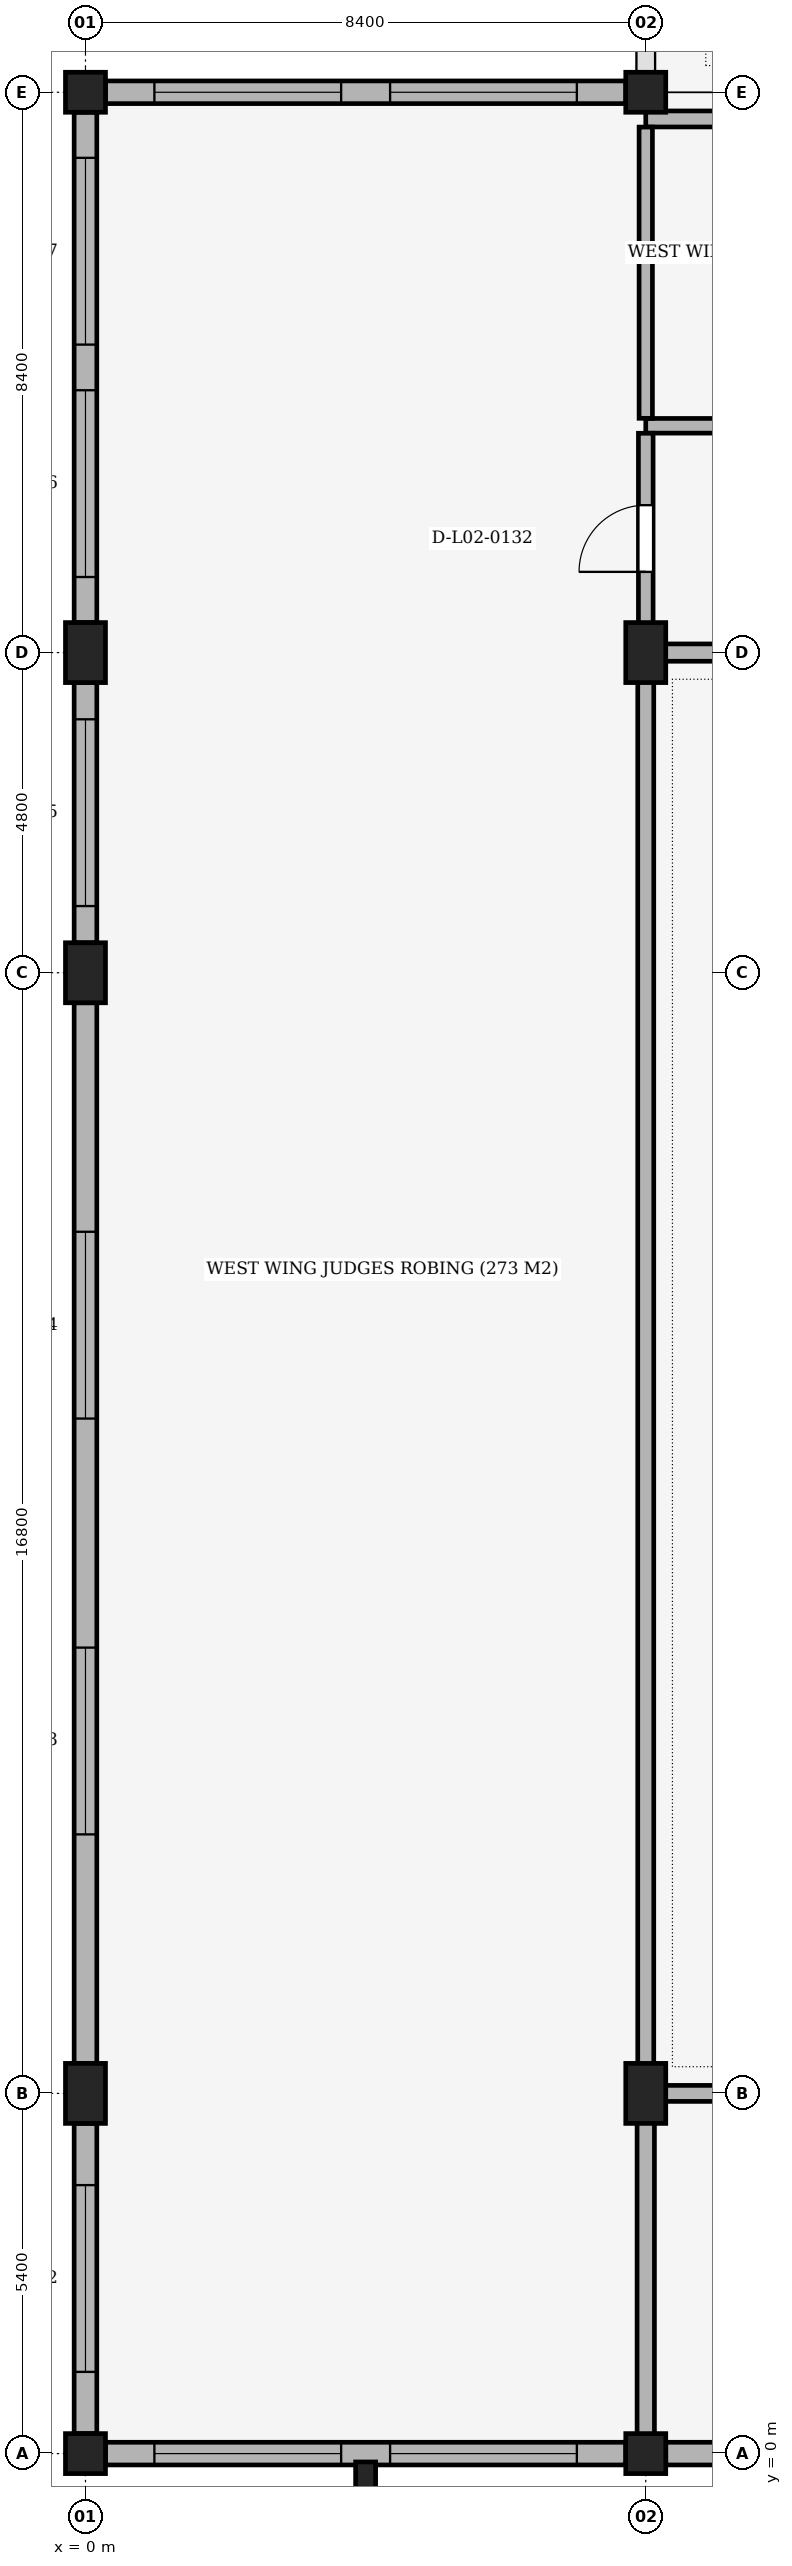
"""IFC4 building model, lengths in metres.
Left out: names, types, materials, properties, quantities, classifications, styles, units other than length and angle.
Written with IfcOpenShell. Run it as: python <this file> out.ifc"""

import sys

from ifc_helpers import new_model, si_unit, direction, frame, frame_2d, origin, origin_with_axes, origin_2d, place, context, subcontext, project, spatial, rectangle, extrude, element, fill, save


model = new_model("IFC4")
c1 = context("Model", 3, precision=1e-05, world=origin(), true_north=direction((0.0, 1.0)))
c2 = subcontext(c1, "Body", "Model", "MODEL_VIEW")
j1 = project(units=[si_unit("LENGTHUNIT", "METRE"), si_unit("PLANEANGLEUNIT", "RADIAN")], contexts=[c1])
p1 = place(None, origin())
s1 = spatial("IfcSite", under=j1, at=p1, CompositionType="ELEMENT")
p2 = place(p1, origin())
s2 = spatial("IfcBuilding", under=s1, at=p2, CompositionType="ELEMENT")
p3 = place(p2, frame((0.0, 0.0, 10.2)))
s3 = spatial("IfcBuildingStorey", under=s2, at=p3, CompositionType="ELEMENT", Elevation=10.2)
p4 = place(p3, origin_with_axes())
e1 = element("IfcColumn", 1, at=p4, inside=s3, PredefinedType="COLUMN", context=c2, shape_type="SweptSolid", body=[
    extrude(rectangle(XDim=0.6, YDim=0.6, at=origin_2d()), origin(), (0.0, 0.0, 1.0), 5.1),
])
for number, where, z_axis, x_axis in (
    (2, (0.0, 5.4, 0.0), (0.0, 0.0, 1.0), (1.0, 0.0, 0.0)),
    (3, (0.0, 22.2, 0.0), (0.0, 0.0, 1.0), (1.0, 0.0, 0.0)),
    (4, (0.0, 27.0, 0.0), (0.0, 0.0, 1.0), (1.0, 0.0, 0.0)),
):
    element("IfcColumn", number, at=place(p3, frame(where, z_axis=z_axis, x_axis=x_axis)), inside=s3, PredefinedType="COLUMN", context=c2, shape_type="SweptSolid", body=[
        extrude(rectangle(XDim=0.6, YDim=0.9, at=origin_2d()), origin(), (0.0, 0.0, 1.0), 5.1),
    ])
for number, where, z_axis, x_axis in (
    (5, (0.0, 35.4, 0.0), (0.0, 0.0, 1.0), (1.0, 0.0, 0.0)),
    (6, (8.4, 0.0, 0.0), (0.0, 0.0, 1.0), (1.0, 0.0, 0.0)),
):
    element("IfcColumn", number, at=place(p3, frame(where, z_axis=z_axis, x_axis=x_axis)), inside=s3, PredefinedType="COLUMN", context=c2, shape_type="SweptSolid", body=[
        extrude(rectangle(XDim=0.6, YDim=0.6, at=origin_2d()), origin(), (0.0, 0.0, 1.0), 5.1),
    ])
for number, where, z_axis, x_axis in (
    (7, (8.4, 5.4, 0.0), (0.0, 0.0, 1.0), (1.0, 0.0, 0.0)),
    (8, (8.4, 27.0, 0.0), (0.0, 0.0, 1.0), (1.0, 0.0, 0.0)),
):
    element("IfcColumn", number, at=place(p3, frame(where, z_axis=z_axis, x_axis=x_axis)), inside=s3, PredefinedType="COLUMN", context=c2, shape_type="SweptSolid", body=[
        extrude(rectangle(XDim=0.6, YDim=0.9, at=origin_2d()), origin(), (0.0, 0.0, 1.0), 5.1),
    ])
p5 = place(p3, frame((8.4, 35.4, 0.0), z_axis=(0.0, 0.0, 1.0), x_axis=(1.0, 0.0, 0.0)))
e9 = element("IfcColumn", 9, at=p5, inside=s3, PredefinedType="COLUMN", context=c2, shape_type="SweptSolid", body=[
    extrude(rectangle(XDim=0.6, YDim=0.6, at=origin_2d()), origin(), (0.0, 0.0, 1.0), 5.1),
])
p6 = place(p3, frame((4.2, -0.35, 0.0), z_axis=(0.0, 0.0, 1.0), x_axis=(1.0, 0.0, 0.0)))
e10 = element("IfcColumn", 10, at=p6, inside=s3, PredefinedType="PILASTER", context=c2, shape_type="SweptSolid", body=[
    extrude(rectangle(XDim=0.3, YDim=0.45, at=origin_2d()), origin(), (0.0, 0.0, 1.0), 5.1),
])
p7 = place(p3, frame((0.3, 35.4, 0.0), z_axis=(0.0, 0.0, 1.0), x_axis=(1.0, 0.0, 0.0)))
e11 = element("IfcWall", 11, at=p7, inside=s3, PredefinedType="SOLIDWALL", context=c2, shape_type="SweptSolid", body=[
    extrude(rectangle(XDim=7.8, YDim=0.34, at=frame_2d((3.9, 0.0))), origin(), (0.0, 0.0, 1.0), 4.12),
])
p8 = place(p7, frame((0.733, 0.0, 0.75)))
e12 = element("IfcOpeningElement", 12, at=p8, cuts=e11, PredefinedType="OPENING", context=c2, shape_type="SweptSolid", body=[
    extrude(rectangle(XDim=2.8, YDim=2.6, at=frame_2d((1.4, 1.3))), frame((0.0, 0.185, 0.0), z_axis=(0.0, -1.0, 0.0), x_axis=(1.0, 0.0, 0.0)), (0.0, 0.0, 1.0), 0.37),
])
p9 = place(p7, frame((4.267, 0.0, 0.75)))
e13 = element("IfcOpeningElement", 13, at=p9, cuts=e11, PredefinedType="OPENING", context=c2, shape_type="SweptSolid", body=[
    extrude(rectangle(XDim=2.8, YDim=2.6, at=frame_2d((1.4, 1.3))), frame((0.0, 0.185, 0.0), z_axis=(0.0, -1.0, 0.0), x_axis=(1.0, 0.0, 0.0)), (0.0, 0.0, 1.0), 0.37),
])
p10 = place(p3, frame((16.5, 0.0, 0.0), z_axis=(0.0, 0.0, 1.0), x_axis=(-1.0, 0.0, 0.0)))
e14 = element("IfcWall", 14, at=p10, inside=s3, PredefinedType="SOLIDWALL", context=c2, shape_type="SweptSolid", body=[
    extrude(rectangle(XDim=7.8, YDim=0.34, at=frame_2d((3.9, 0.0))), origin(), (0.0, 0.0, 1.0), 4.12),
])
p11 = place(p10, frame((0.733, 0.0, 0.75)))
e15 = element("IfcOpeningElement", 15, at=p11, cuts=e14, PredefinedType="OPENING", context=c2, shape_type="SweptSolid", body=[
    extrude(rectangle(XDim=2.8, YDim=2.6, at=frame_2d((1.4, 1.3))), frame((0.0, 0.185, 0.0), z_axis=(0.0, -1.0, 0.0), x_axis=(1.0, 0.0, 0.0)), (0.0, 0.0, 1.0), 0.37),
])
p12 = place(p10, frame((4.267, 0.0, 0.75)))
e16 = element("IfcOpeningElement", 16, at=p12, cuts=e14, PredefinedType="OPENING", context=c2, shape_type="SweptSolid", body=[
    extrude(rectangle(XDim=2.8, YDim=2.6, at=frame_2d((1.4, 1.3))), frame((0.0, 0.185, 0.0), z_axis=(0.0, -1.0, 0.0), x_axis=(1.0, 0.0, 0.0)), (0.0, 0.0, 1.0), 0.37),
])
p13 = place(p3, frame((8.1, 0.0, 0.0), z_axis=(0.0, 0.0, 1.0), x_axis=(-1.0, 0.0, 0.0)))
e17 = element("IfcWall", 17, at=p13, inside=s3, PredefinedType="SOLIDWALL", context=c2, shape_type="SweptSolid", body=[
    extrude(rectangle(XDim=7.8, YDim=0.34, at=frame_2d((3.9, 0.0))), origin(), (0.0, 0.0, 1.0), 4.12),
])
p14 = place(p13, frame((0.733, 0.0, 0.75)))
e18 = element("IfcOpeningElement", 18, at=p14, cuts=e17, PredefinedType="OPENING", context=c2, shape_type="SweptSolid", body=[
    extrude(rectangle(XDim=2.8, YDim=2.6, at=frame_2d((1.4, 1.3))), frame((0.0, 0.185, 0.0), z_axis=(0.0, -1.0, 0.0), x_axis=(1.0, 0.0, 0.0)), (0.0, 0.0, 1.0), 0.37),
])
p15 = place(p13, frame((4.267, 0.0, 0.75)))
e19 = element("IfcOpeningElement", 19, at=p15, cuts=e17, PredefinedType="OPENING", context=c2, shape_type="SweptSolid", body=[
    extrude(rectangle(XDim=2.8, YDim=2.6, at=frame_2d((1.4, 1.3))), frame((0.0, 0.185, 0.0), z_axis=(0.0, -1.0, 0.0), x_axis=(1.0, 0.0, 0.0)), (0.0, 0.0, 1.0), 0.37),
])
p16 = place(p3, frame((0.0, 0.3, 0.0), z_axis=(0.0, 0.0, 1.0), x_axis=(0.0, 1.0, 0.0)))
e20 = element("IfcWall", 20, at=p16, inside=s3, PredefinedType="SOLIDWALL", context=c2, shape_type="SweptSolid", body=[
    extrude(rectangle(XDim=4.65, YDim=0.34, at=frame_2d((2.325, 0.0))), origin(), (0.0, 0.0, 1.0), 4.27),
])
p17 = place(p16, frame((0.925, 0.0, 0.75)))
e21 = element("IfcOpeningElement", 21, at=p17, cuts=e20, PredefinedType="OPENING", context=c2, shape_type="SweptSolid", body=[
    extrude(rectangle(XDim=2.8, YDim=2.6, at=frame_2d((1.4, 1.3))), frame((0.0, 0.185, 0.0), z_axis=(0.0, -1.0, 0.0), x_axis=(1.0, 0.0, 0.0)), (0.0, 0.0, 1.0), 0.37),
])
p18 = place(p3, frame((0.0, 5.85, 0.0), z_axis=(0.0, 0.0, 1.0), x_axis=(0.0, 1.0, 0.0)))
e22 = element("IfcWall", 22, at=p18, inside=s3, PredefinedType="SOLIDWALL", context=c2, shape_type="SweptSolid", body=[
    extrude(rectangle(XDim=15.9, YDim=0.34, at=frame_2d((7.95, 0.0))), origin(), (0.0, 0.0, 1.0), 3.77),
])
p19 = place(p18, frame((3.433, 0.0, 0.75)))
e23 = element("IfcOpeningElement", 23, at=p19, cuts=e22, PredefinedType="OPENING", context=c2, shape_type="SweptSolid", body=[
    extrude(rectangle(XDim=2.8, YDim=2.6, at=frame_2d((1.4, 1.3))), frame((0.0, 0.185, 0.0), z_axis=(0.0, -1.0, 0.0), x_axis=(1.0, 0.0, 0.0)), (0.0, 0.0, 1.0), 0.37),
])
p20 = place(p18, frame((9.667, 0.0, 0.75)))
e24 = element("IfcOpeningElement", 24, at=p20, cuts=e22, PredefinedType="OPENING", context=c2, shape_type="SweptSolid", body=[
    extrude(rectangle(XDim=2.8, YDim=2.6, at=frame_2d((1.4, 1.3))), frame((0.0, 0.185, 0.0), z_axis=(0.0, -1.0, 0.0), x_axis=(1.0, 0.0, 0.0)), (0.0, 0.0, 1.0), 0.37),
])
p21 = place(p3, frame((0.0, 22.65, 0.0), z_axis=(0.0, 0.0, 1.0), x_axis=(0.0, 1.0, 0.0)))
e25 = element("IfcWall", 25, at=p21, inside=s3, PredefinedType="SOLIDWALL", context=c2, shape_type="SweptSolid", body=[
    extrude(rectangle(XDim=3.9, YDim=0.34, at=frame_2d((1.95, 0.0))), origin(), (0.0, 0.0, 1.0), 4.27),
])
p22 = place(p21, frame((0.55, 0.0, 0.75)))
e26 = element("IfcOpeningElement", 26, at=p22, cuts=e25, PredefinedType="OPENING", context=c2, shape_type="SweptSolid", body=[
    extrude(rectangle(XDim=2.8, YDim=2.6, at=frame_2d((1.4, 1.3))), frame((0.0, 0.185, 0.0), z_axis=(0.0, -1.0, 0.0), x_axis=(1.0, 0.0, 0.0)), (0.0, 0.0, 1.0), 0.37),
])
p23 = place(p3, frame((0.0, 27.45, 0.0), z_axis=(0.0, 0.0, 1.0), x_axis=(0.0, 1.0, 0.0)))
e27 = element("IfcWall", 27, at=p23, inside=s3, PredefinedType="SOLIDWALL", context=c2, shape_type="SweptSolid", body=[
    extrude(rectangle(XDim=7.65, YDim=0.34, at=frame_2d((3.825, 0.0))), origin(), (0.0, 0.0, 1.0), 4.12),
])
p24 = place(p23, frame((0.683, 0.0, 0.75)))
e28 = element("IfcOpeningElement", 28, at=p24, cuts=e27, PredefinedType="OPENING", context=c2, shape_type="SweptSolid", body=[
    extrude(rectangle(XDim=2.8, YDim=2.6, at=frame_2d((1.4, 1.3))), frame((0.0, 0.185, 0.0), z_axis=(0.0, -1.0, 0.0), x_axis=(1.0, 0.0, 0.0)), (0.0, 0.0, 1.0), 0.37),
])
p25 = place(p23, frame((4.167, 0.0, 0.75)))
e29 = element("IfcOpeningElement", 29, at=p25, cuts=e27, PredefinedType="OPENING", context=c2, shape_type="SweptSolid", body=[
    extrude(rectangle(XDim=2.8, YDim=2.6, at=frame_2d((1.4, 1.3))), frame((0.0, 0.185, 0.0), z_axis=(0.0, -1.0, 0.0), x_axis=(1.0, 0.0, 0.0)), (0.0, 0.0, 1.0), 0.37),
])
p26 = place(p3, frame((8.4, 5.4, 0.0), z_axis=(0.0, 0.0, 1.0), x_axis=(1.0, 0.0, 0.0)))
e30 = element("IfcWall", 30, at=p26, inside=s3, PredefinedType="PARTITIONING", context=c2, shape_type="SweptSolid", body=[
    extrude(rectangle(XDim=16.8, YDim=0.24, at=frame_2d((8.4, 0.0))), origin(), (0.0, 0.0, 1.0), 3.57),
])
p27 = place(p26, frame((7.95, 0.0, 0.0)))
e31 = element("IfcOpeningElement", 31, at=p27, cuts=e30, PredefinedType="OPENING", context=c2, shape_type="SweptSolid", body=[
    extrude(rectangle(XDim=0.9, YDim=2.1, at=frame_2d((0.45, 1.05))), frame((0.0, 0.135, 0.0), z_axis=(0.0, -1.0, 0.0), x_axis=(1.0, 0.0, 0.0)), (0.0, 0.0, 1.0), 0.27),
])
p28 = place(p3, frame((8.4, 27.0, 0.0), z_axis=(0.0, 0.0, 1.0), x_axis=(1.0, 0.0, 0.0)))
e32 = element("IfcWall", 32, at=p28, inside=s3, PredefinedType="PARTITIONING", context=c2, shape_type="SweptSolid", body=[
    extrude(rectangle(XDim=16.8, YDim=0.26, at=frame_2d((8.4, 0.0))), origin(), (0.0, 0.0, 1.0), 3.57),
])
p29 = place(p28, frame((7.4, 0.0, 0.0)))
e33 = element("IfcOpeningElement", 33, at=p29, cuts=e32, PredefinedType="OPENING", context=c2, shape_type="SweptSolid", body=[
    extrude(rectangle(XDim=2.0, YDim=2.5, at=frame_2d((1.0, 1.25))), frame((0.0, 0.145, 0.0), z_axis=(0.0, -1.0, 0.0), x_axis=(1.0, 0.0, 0.0)), (0.0, 0.0, 1.0), 0.29),
])
p30 = place(p3, frame((8.4, 30.4, 0.0), z_axis=(0.0, 0.0, 1.0), x_axis=(1.0, 0.0, 0.0)))
e34 = element("IfcWall", 34, at=p30, inside=s3, PredefinedType="PARTITIONING", context=c2, shape_type="SweptSolid", body=[
    extrude(rectangle(XDim=5.4, YDim=0.22, at=frame_2d((2.7, 0.0))), origin(), (0.0, 0.0, 1.0), 4.12),
])
p31 = place(p30, frame((2.25, 0.0, 0.0)))
e35 = element("IfcOpeningElement", 35, at=p31, cuts=e34, PredefinedType="OPENING", context=c2, shape_type="SweptSolid", body=[
    extrude(rectangle(XDim=0.9, YDim=2.2, at=frame_2d((0.45, 1.1))), frame((0.0, 0.125, 0.0), z_axis=(0.0, -1.0, 0.0), x_axis=(1.0, 0.0, 0.0)), (0.0, 0.0, 1.0), 0.25),
])
p32 = place(p3, frame((8.4, 35.0, 0.0), z_axis=(0.0, 0.0, 1.0), x_axis=(1.0, 0.0, 0.0)))
e36 = element("IfcWall", 36, at=p32, inside=s3, PredefinedType="PARTITIONING", context=c2, shape_type="SweptSolid", body=[
    extrude(rectangle(XDim=5.4, YDim=0.24, at=frame_2d((2.7, 0.0))), origin(), (0.0, 0.0, 1.0), 4.12),
])
p33 = place(p3, frame((8.4, -0.064, 0.0), z_axis=(0.0, 0.0, 1.0), x_axis=(0.0, 1.0, 0.0)))
e37 = element("IfcWall", 37, at=p33, inside=s3, PredefinedType="PARTITIONING", context=c2, shape_type="SweptSolid", body=[
    extrude(rectangle(XDim=5.342, YDim=0.26, at=frame_2d((2.671, 0.0))), origin(), (0.0, 0.0, 1.0), 3.67),
])
p34 = place(p3, frame((8.4, 5.522, 0.0), z_axis=(0.0, 0.0, 1.0), x_axis=(0.0, 1.0, 0.0)))
e38 = element("IfcWall", 38, at=p34, inside=s3, PredefinedType="PARTITIONING", context=c2, shape_type="SweptSolid", body=[
    extrude(rectangle(XDim=21.346, YDim=0.24, at=frame_2d((10.673, 0.0))), origin(), (0.0, 0.0, 1.0), 3.57),
])
p35 = place(p3, frame((8.4, 27.132, 0.0), z_axis=(0.0, 0.0, 1.0), x_axis=(0.0, 1.0, 0.0)))
e39 = element("IfcWall", 39, at=p35, inside=s3, PredefinedType="PARTITIONING", context=c2, shape_type="SweptSolid", body=[
    extrude(rectangle(XDim=3.156, YDim=0.22, at=frame_2d((1.578, 0.0))), origin(), (0.0, 0.0, 1.0), 3.67),
])
p36 = place(p35, frame((1.078, 0.0, 0.0)))
e40 = element("IfcOpeningElement", 40, at=p36, cuts=e39, PredefinedType="OPENING", context=c2, shape_type="SweptSolid", body=[
    extrude(rectangle(XDim=1.0, YDim=2.1, at=frame_2d((0.5, 1.05))), frame((0.0, 0.125, 0.0), z_axis=(0.0, -1.0, 0.0), x_axis=(1.0, 0.0, 0.0)), (0.0, 0.0, 1.0), 0.25),
])
p37 = place(p3, frame((8.4, 30.512, 0.0), z_axis=(0.0, 0.0, 1.0), x_axis=(0.0, 1.0, 0.0)))
e41 = element("IfcWall", 41, at=p37, inside=s3, PredefinedType="PARTITIONING", context=c2, shape_type="SweptSolid", body=[
    extrude(rectangle(XDim=4.366, YDim=0.2, at=frame_2d((2.183, 0.0))), origin(), (0.0, 0.0, 1.0), 4.12),
])
p38 = place(p8, origin())
e42 = element("IfcWindow", 42, at=p38, inside=s3, PartitioningType="SINGLE_PANEL", PredefinedType="WINDOW", context=c2, shape_type="SweptSolid", body=[
    extrude(rectangle(XDim=2.8, YDim=2.6, at=frame_2d((1.4, 1.3))), frame((0.0, 0.03, 0.0), z_axis=(0.0, -1.0, 0.0), x_axis=(1.0, 0.0, 0.0)), (0.0, 0.0, 1.0), 0.06),
])
fill(e12, e42)
p39 = place(p9, origin())
e43 = element("IfcWindow", 43, at=p39, inside=s3, PartitioningType="SINGLE_PANEL", PredefinedType="WINDOW", context=c2, shape_type="SweptSolid", body=[
    extrude(rectangle(XDim=2.8, YDim=2.6, at=frame_2d((1.4, 1.3))), frame((0.0, 0.03, 0.0), z_axis=(0.0, -1.0, 0.0), x_axis=(1.0, 0.0, 0.0)), (0.0, 0.0, 1.0), 0.06),
])
fill(e13, e43)
p40 = place(p14, origin())
e44 = element("IfcWindow", 44, at=p40, inside=s3, PartitioningType="SINGLE_PANEL", PredefinedType="WINDOW", context=c2, shape_type="SweptSolid", body=[
    extrude(rectangle(XDim=2.8, YDim=2.6, at=frame_2d((1.4, 1.3))), frame((0.0, 0.03, 0.0), z_axis=(0.0, -1.0, 0.0), x_axis=(1.0, 0.0, 0.0)), (0.0, 0.0, 1.0), 0.06),
])
fill(e18, e44)
p41 = place(p15, origin())
e45 = element("IfcWindow", 45, at=p41, inside=s3, PartitioningType="SINGLE_PANEL", PredefinedType="WINDOW", context=c2, shape_type="SweptSolid", body=[
    extrude(rectangle(XDim=2.8, YDim=2.6, at=frame_2d((1.4, 1.3))), frame((0.0, 0.03, 0.0), z_axis=(0.0, -1.0, 0.0), x_axis=(1.0, 0.0, 0.0)), (0.0, 0.0, 1.0), 0.06),
])
fill(e19, e45)
p42 = place(p17, origin())
e46 = element("IfcWindow", 46, at=p42, inside=s3, PartitioningType="SINGLE_PANEL", PredefinedType="WINDOW", context=c2, shape_type="SweptSolid", body=[
    extrude(rectangle(XDim=2.8, YDim=2.6, at=frame_2d((1.4, 1.3))), frame((0.0, 0.03, 0.0), z_axis=(0.0, -1.0, 0.0), x_axis=(1.0, 0.0, 0.0)), (0.0, 0.0, 1.0), 0.06),
])
fill(e21, e46)
p43 = place(p19, origin())
e47 = element("IfcWindow", 47, at=p43, inside=s3, PartitioningType="SINGLE_PANEL", PredefinedType="WINDOW", context=c2, shape_type="SweptSolid", body=[
    extrude(rectangle(XDim=2.8, YDim=2.6, at=frame_2d((1.4, 1.3))), frame((0.0, 0.03, 0.0), z_axis=(0.0, -1.0, 0.0), x_axis=(1.0, 0.0, 0.0)), (0.0, 0.0, 1.0), 0.06),
])
fill(e23, e47)
p44 = place(p20, origin())
e48 = element("IfcWindow", 48, at=p44, inside=s3, PartitioningType="SINGLE_PANEL", PredefinedType="WINDOW", context=c2, shape_type="SweptSolid", body=[
    extrude(rectangle(XDim=2.8, YDim=2.6, at=frame_2d((1.4, 1.3))), frame((0.0, 0.03, 0.0), z_axis=(0.0, -1.0, 0.0), x_axis=(1.0, 0.0, 0.0)), (0.0, 0.0, 1.0), 0.06),
])
fill(e24, e48)
p45 = place(p22, origin())
e49 = element("IfcWindow", 49, at=p45, inside=s3, PartitioningType="SINGLE_PANEL", PredefinedType="WINDOW", context=c2, shape_type="SweptSolid", body=[
    extrude(rectangle(XDim=2.8, YDim=2.6, at=frame_2d((1.4, 1.3))), frame((0.0, 0.03, 0.0), z_axis=(0.0, -1.0, 0.0), x_axis=(1.0, 0.0, 0.0)), (0.0, 0.0, 1.0), 0.06),
])
fill(e26, e49)
p46 = place(p24, origin())
e50 = element("IfcWindow", 50, at=p46, inside=s3, PartitioningType="SINGLE_PANEL", PredefinedType="WINDOW", context=c2, shape_type="SweptSolid", body=[
    extrude(rectangle(XDim=2.8, YDim=2.6, at=frame_2d((1.4, 1.3))), frame((0.0, 0.03, 0.0), z_axis=(0.0, -1.0, 0.0), x_axis=(1.0, 0.0, 0.0)), (0.0, 0.0, 1.0), 0.06),
])
fill(e28, e50)
p47 = place(p25, origin())
e51 = element("IfcWindow", 51, at=p47, inside=s3, PartitioningType="SINGLE_PANEL", PredefinedType="WINDOW", context=c2, shape_type="SweptSolid", body=[
    extrude(rectangle(XDim=2.8, YDim=2.6, at=frame_2d((1.4, 1.3))), frame((0.0, 0.03, 0.0), z_axis=(0.0, -1.0, 0.0), x_axis=(1.0, 0.0, 0.0)), (0.0, 0.0, 1.0), 0.06),
])
fill(e29, e51)
p48 = place(p36, origin())
e52 = element("IfcDoor", 52, at=p48, inside=s3, OperationType="SINGLE_SWING_LEFT", PredefinedType="DOOR", context=c2, shape_type="SweptSolid", body=[
    extrude(rectangle(XDim=1.0, YDim=2.1, at=frame_2d((0.5, 1.05))), frame((0.0, 0.025, 0.0), z_axis=(0.0, -1.0, 0.0), x_axis=(1.0, 0.0, 0.0)), (0.0, 0.0, 1.0), 0.05),
])
fill(e40, e52)
save(model, sys.argv[1])
